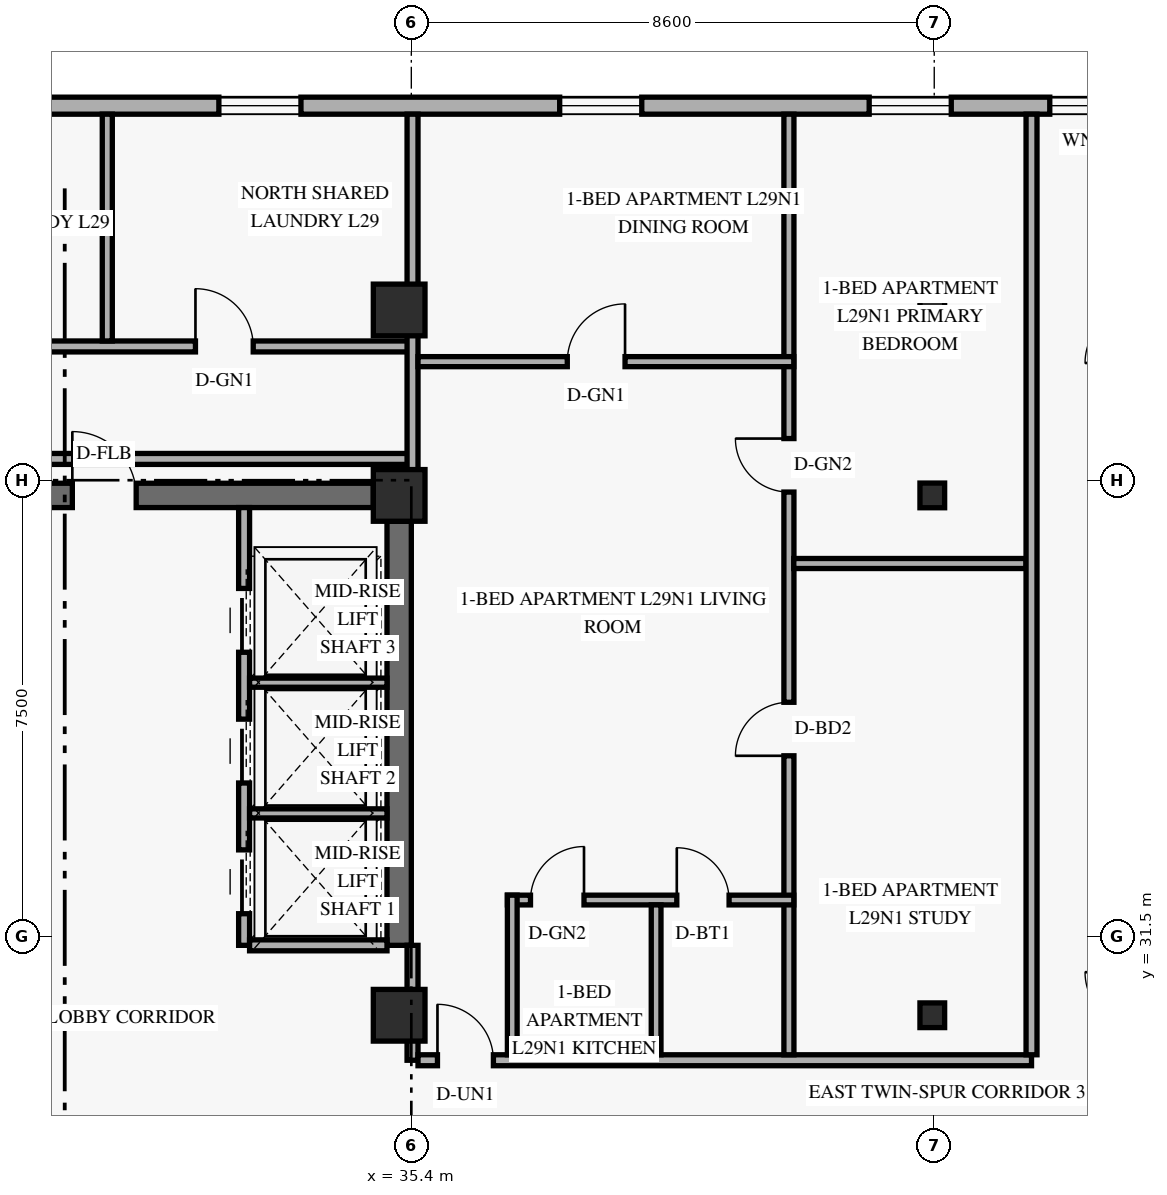
"""IFC4 building model, lengths in metres.
Left out: names, types, materials, properties, quantities, classifications, styles, units other than length and angle.
Written with IfcOpenShell. Run it as: python <this file> out.ifc"""

import sys

from ifc_helpers import new_model, si_unit, direction, frame, frame_2d, origin, origin_2d, place, context, subcontext, project, spatial, rectangle, hollow_rectangle, extrude, element, fill, save


model = new_model("IFC4")
c1 = context("Model", 3, precision=1e-05, world=origin(), true_north=direction((0.0, 1.0)))
c2 = subcontext(c1, "Body", "Model", "MODEL_VIEW")
j1 = project(units=[si_unit("LENGTHUNIT", "METRE"), si_unit("PLANEANGLEUNIT", "RADIAN")], contexts=[c1])
p1 = place(None, origin())
s1 = spatial("IfcSite", under=j1, at=p1, CompositionType="ELEMENT")
p2 = place(p1, origin())
s2 = spatial("IfcBuilding", under=s1, at=p2, CompositionType="ELEMENT")
p3 = place(p2, frame((0.0, 0.0, 113.4)))
s3 = spatial("IfcBuildingStorey", under=s2, at=p3, CompositionType="ELEMENT", Elevation=113.4)
p4 = place(p3, frame((35.2, 31.35, 0.0), z_axis=(0.0, 0.0, 1.0), x_axis=(0.0, 1.0, 0.0)))
e1 = element("IfcWall", 1, at=p4, inside=s3, PredefinedType="SHEAR", context=c2, shape_type="SweptSolid", body=[
    extrude(rectangle(XDim=6.975, YDim=0.4, at=frame_2d((3.487, 0.0))), origin(), (0.0, 0.0, 1.0), 2.739),
])
p5 = place(p3, frame((24.625, 38.75, 0.0), z_axis=(0.0, 0.0, 1.0), x_axis=(1.0, 0.0, 0.0)))
e2 = element("IfcWall", 2, at=p5, inside=s3, PredefinedType="SHEAR", context=c2, shape_type="SweptSolid", body=[
    extrude(rectangle(XDim=10.15, YDim=0.4, at=frame_2d((5.075, 0.0))), origin(), (0.0, 0.0, 1.0), 3.35),
])
p6 = place(p5, frame((5.2, 0.0, 0.0)))
e3 = element("IfcOpeningElement", 3, at=p6, cuts=e2, PredefinedType="OPENING", context=c2, shape_type="SweptSolid", body=[
    extrude(rectangle(XDim=1.05, YDim=2.15, at=frame_2d((0.525, 1.075))), frame((0.0, 0.21, 0.0), z_axis=(0.0, -1.0, 0.0), x_axis=(1.0, 0.0, 0.0)), (0.0, 0.0, 1.0), 0.42),
])
for number, where, z_axis, x_axis in (
    (4, (35.2, 30.2, 0.0), (0.0, 0.0, 1.0), (1.0, 0.0, 0.0)),
    (5, (35.2, 38.75, 0.0), (0.0, 0.0, 1.0), (1.0, 0.0, 0.0)),
    (6, (35.2, 41.8, 0.0), (0.0, 0.0, 1.0), (1.0, 0.0, 0.0)),
):
    element("IfcColumn", number, at=place(p3, frame(where, z_axis=z_axis, x_axis=x_axis)), inside=s3, PredefinedType="COLUMN", context=c2, shape_type="SweptSolid", body=[
        extrude(rectangle(XDim=0.85, YDim=0.85, at=origin_2d()), origin(), (0.0, 0.0, 1.0), 3.6),
    ])
for number, where, z_axis, x_axis in (
    (7, (43.905, 30.2, 0.0), (0.035, 0.0, 0.999), (0.0, 1.0, 0.0)),
    (8, (43.905, 38.75, 0.0), (0.035, 0.0, 0.999), (0.0, 1.0, 0.0)),
    (9, (43.905, 41.8, 0.0), (0.035, 0.0, 0.999), (0.0, 1.0, 0.0)),
):
    element("IfcColumn", number, at=place(p3, frame(where, z_axis=z_axis, x_axis=x_axis)), inside=s3, PredefinedType="COLUMN", context=c2, shape_type="SweptSolid", body=[
        extrude(hollow_rectangle(XDim=0.406, YDim=0.406, WallThickness=0.016, at=origin_2d()), origin(), (0.0, 0.0, 1.0), 3.602),
    ])
p7 = place(p3, frame((49.98, 45.16, 0.0), z_axis=(0.0, 0.0, 1.0), x_axis=(-1.0, 0.0, 0.0)))
e10 = element("IfcWall", 10, at=p7, inside=s3, PredefinedType="SOLIDWALL", context=c2, shape_type="SweptSolid", body=[
    extrude(rectangle(XDim=36.56, YDim=0.28, at=frame_2d((18.28, 0.0))), origin(), (0.0, 0.0, 1.0), 3.35),
])
p8 = place(p7, frame((31.77, 0.0, 0.85)))
e11 = element("IfcOpeningElement", 11, at=p8, cuts=e10, PredefinedType="OPENING", context=c2, shape_type="SweptSolid", body=[
    extrude(rectangle(XDim=1.35, YDim=1.55, at=frame_2d((0.675, 0.775))), frame((0.0, 0.15, 0.0), z_axis=(0.0, -1.0, 0.0), x_axis=(1.0, 0.0, 0.0)), (0.0, 0.0, 1.0), 0.3),
])
p9 = place(p7, frame((23.28, 0.0, 0.85)))
e12 = element("IfcOpeningElement", 12, at=p9, cuts=e10, PredefinedType="OPENING", context=c2, shape_type="SweptSolid", body=[
    extrude(rectangle(XDim=1.35, YDim=1.55, at=frame_2d((0.675, 0.775))), frame((0.0, 0.15, 0.0), z_axis=(0.0, -1.0, 0.0), x_axis=(1.0, 0.0, 0.0)), (0.0, 0.0, 1.0), 0.3),
])
p10 = place(p7, frame((16.395, 0.0, 0.85)))
e13 = element("IfcOpeningElement", 13, at=p10, cuts=e10, PredefinedType="OPENING", context=c2, shape_type="SweptSolid", body=[
    extrude(rectangle(XDim=1.35, YDim=1.55, at=frame_2d((0.675, 0.775))), frame((0.0, 0.15, 0.0), z_axis=(0.0, -1.0, 0.0), x_axis=(1.0, 0.0, 0.0)), (0.0, 0.0, 1.0), 0.3),
])
p11 = place(p7, frame((10.79, 0.0, 0.85)))
e14 = element("IfcOpeningElement", 14, at=p11, cuts=e10, PredefinedType="OPENING", context=c2, shape_type="SweptSolid", body=[
    extrude(rectangle(XDim=1.35, YDim=1.55, at=frame_2d((0.675, 0.775))), frame((0.0, 0.15, 0.0), z_axis=(0.0, -1.0, 0.0), x_axis=(1.0, 0.0, 0.0)), (0.0, 0.0, 1.0), 0.3),
])
p12 = place(p7, frame((5.7, 0.0, 0.85)))
e15 = element("IfcOpeningElement", 15, at=p12, cuts=e10, PredefinedType="OPENING", context=c2, shape_type="SweptSolid", body=[
    extrude(rectangle(XDim=1.35, YDim=1.55, at=frame_2d((0.675, 0.775))), frame((0.0, 0.15, 0.0), z_axis=(0.0, -1.0, 0.0), x_axis=(1.0, 0.0, 0.0)), (0.0, 0.0, 1.0), 0.3),
])
p13 = place(p7, frame((2.88, 0.0, 0.85)))
e16 = element("IfcOpeningElement", 16, at=p13, cuts=e10, PredefinedType="OPENING", context=c2, shape_type="SweptSolid", body=[
    extrude(rectangle(XDim=1.2, YDim=1.5, at=frame_2d((0.6, 0.75))), frame((0.0, 0.15, 0.0), z_axis=(0.0, -1.0, 0.0), x_axis=(1.0, 0.0, 0.0)), (0.0, 0.0, 1.0), 0.3),
])
p14 = place(p7, frame((0.615, 0.0, 0.85)))
e17 = element("IfcOpeningElement", 17, at=p14, cuts=e10, PredefinedType="OPENING", context=c2, shape_type="SweptSolid", body=[
    extrude(rectangle(XDim=1.35, YDim=1.55, at=frame_2d((0.675, 0.775))), frame((0.0, 0.15, 0.0), z_axis=(0.0, -1.0, 0.0), x_axis=(1.0, 0.0, 0.0)), (0.0, 0.0, 1.0), 0.3),
])
p15 = place(p3, frame((32.65, 31.35, 0.0), z_axis=(0.0, 0.0, 1.0), x_axis=(0.0, 1.0, 0.0)))
e18 = element("IfcWall", 18, at=p15, inside=s3, PredefinedType="STANDARD", context=c2, shape_type="SweptSolid", body=[
    extrude(rectangle(XDim=7.2, YDim=0.18, at=frame_2d((3.6, 0.0))), origin(), (0.0, 0.0, 1.0), 3.35),
])
p16 = place(p15, frame((0.52, 0.0, 0.0)))
e19 = element("IfcOpeningElement", 19, at=p16, cuts=e18, PredefinedType="OPENING", context=c2, shape_type="SweptSolid", body=[
    extrude(rectangle(XDim=1.05, YDim=2.2, at=frame_2d((0.525, 1.1))), frame((0.0, 0.1, 0.0), z_axis=(0.0, -1.0, 0.0), x_axis=(1.0, 0.0, 0.0)), (0.0, 0.0, 1.0), 0.2),
])
p17 = place(p15, frame((2.67, 0.0, 0.0)))
e20 = element("IfcOpeningElement", 20, at=p17, cuts=e18, PredefinedType="OPENING", context=c2, shape_type="SweptSolid", body=[
    extrude(rectangle(XDim=1.05, YDim=2.2, at=frame_2d((0.525, 1.1))), frame((0.0, 0.1, 0.0), z_axis=(0.0, -1.0, 0.0), x_axis=(1.0, 0.0, 0.0)), (0.0, 0.0, 1.0), 0.2),
])
p18 = place(p15, frame((4.82, 0.0, 0.0)))
e21 = element("IfcOpeningElement", 21, at=p18, cuts=e18, PredefinedType="OPENING", context=c2, shape_type="SweptSolid", body=[
    extrude(rectangle(XDim=1.05, YDim=2.2, at=frame_2d((0.525, 1.1))), frame((0.0, 0.1, 0.0), z_axis=(0.0, -1.0, 0.0), x_axis=(1.0, 0.0, 0.0)), (0.0, 0.0, 1.0), 0.2),
])
p19 = place(p3, frame((32.74, 31.35, 0.0), z_axis=(0.0, 0.0, 1.0), x_axis=(1.0, 0.0, 0.0)))
e22 = element("IfcWall", 22, at=p19, inside=s3, PredefinedType="STANDARD", context=c2, shape_type="SweptSolid", body=[
    extrude(rectangle(XDim=2.26, YDim=0.18, at=frame_2d((1.13, 0.0))), origin(), (0.0, 0.0, 1.0), 3.35),
])
for number, where, z_axis, x_axis in (
    (23, (32.74, 33.52, 0.0), (0.0, 0.0, 1.0), (1.0, 0.0, 0.0)),
    (24, (32.74, 35.67, 0.0), (0.0, 0.0, 1.0), (1.0, 0.0, 0.0)),
):
    element("IfcWall", number, at=place(p3, frame(where, z_axis=z_axis, x_axis=x_axis)), inside=s3, PredefinedType="STANDARD", context=c2, shape_type="SweptSolid", body=[
        extrude(rectangle(XDim=2.26, YDim=0.15, at=frame_2d((1.13, 0.0))), origin(), (0.0, 0.0, 1.0), 3.35),
    ])
p20 = place(p3, frame((35.42, 29.46, 0.0), z_axis=(0.0, 0.0, 1.0), x_axis=(0.0, 1.0, 0.0)))
e25 = element("IfcWall", 25, at=p20, inside=s3, PredefinedType="STANDARD", context=c2, shape_type="SweptSolid", body=[
    extrude(rectangle(XDim=1.89, YDim=0.18, at=frame_2d((0.945, 0.0))), origin(), (0.0, 0.0, 1.0), 2.721),
])
p21 = place(p3, frame((35.51, 29.46, 0.0), z_axis=(0.0, 0.0, 1.0), x_axis=(1.0, 0.0, 0.0)))
e26 = element("IfcWall", 26, at=p21, inside=s3, PredefinedType="STANDARD", context=c2, shape_type="SweptSolid", body=[
    extrude(rectangle(XDim=10.09, YDim=0.18, at=frame_2d((5.045, 0.0))), origin(), (0.0, 0.0, 1.0), 2.721),
])
p22 = place(p21, frame((0.32, 0.0, 0.0)))
e27 = element("IfcOpeningElement", 27, at=p22, cuts=e26, PredefinedType="OPENING", context=c2, shape_type="SweptSolid", body=[
    extrude(rectangle(XDim=0.92, YDim=2.15, at=frame_2d((0.46, 1.075))), frame((0.0, 0.1, 0.0), z_axis=(0.0, -1.0, 0.0), x_axis=(1.0, 0.0, 0.0)), (0.0, 0.0, 1.0), 0.2),
])
p23 = place(p3, frame((21.74, 41.2, 0.0), z_axis=(0.0, 0.0, 1.0), x_axis=(1.0, 0.0, 0.0)))
e28 = element("IfcWall", 28, at=p23, inside=s3, PredefinedType="STANDARD", context=c2, shape_type="SweptSolid", body=[
    extrude(rectangle(XDim=13.68, YDim=0.18, at=frame_2d((6.84, 0.0))), origin(), (0.0, 0.0, 1.0), 2.721),
])
p24 = place(p23, frame((3.09, 0.0, 0.0)))
e29 = element("IfcOpeningElement", 29, at=p24, cuts=e28, PredefinedType="OPENING", context=c2, shape_type="SweptSolid", body=[
    extrude(rectangle(XDim=0.95, YDim=2.15, at=frame_2d((0.475, 1.075))), frame((0.0, 0.1, 0.0), z_axis=(0.0, -1.0, 0.0), x_axis=(1.0, 0.0, 0.0)), (0.0, 0.0, 1.0), 0.2),
])
p25 = place(p23, frame((10.11, 0.0, 0.0)))
e30 = element("IfcOpeningElement", 30, at=p25, cuts=e28, PredefinedType="OPENING", context=c2, shape_type="SweptSolid", body=[
    extrude(rectangle(XDim=0.95, YDim=2.15, at=frame_2d((0.475, 1.075))), frame((0.0, 0.1, 0.0), z_axis=(0.0, -1.0, 0.0), x_axis=(1.0, 0.0, 0.0)), (0.0, 0.0, 1.0), 0.2),
])
p26 = place(p3, frame((23.85, 39.35, 0.0), z_axis=(0.0, 0.0, 1.0), x_axis=(1.0, 0.0, 0.0)))
e31 = element("IfcWall", 31, at=p26, inside=s3, PredefinedType="STANDARD", context=c2, shape_type="SweptSolid", body=[
    extrude(rectangle(XDim=11.57, YDim=0.18, at=frame_2d((5.785, 0.0))), origin(), (0.0, 0.0, 1.0), 2.721),
])
p27 = place(p3, frame((35.42, 38.75, 0.0), z_axis=(0.0, 0.0, 1.0), x_axis=(0.0, 1.0, 0.0)))
e32 = element("IfcWall", 32, at=p27, inside=s3, PredefinedType="PARTITIONING", context=c2, shape_type="SweptSolid", body=[
    extrude(rectangle(XDim=6.27, YDim=0.18, at=frame_2d((3.135, 0.0))), origin(), (0.0, 0.0, 1.0), 2.721),
])
p28 = place(p3, frame((41.61, 29.55, 0.0), z_axis=(0.0, 0.0, 1.0), x_axis=(0.0, 1.0, 0.0)))
e33 = element("IfcWall", 33, at=p28, inside=s3, PredefinedType="PARTITIONING", context=c2, shape_type="SweptSolid", body=[
    extrude(rectangle(XDim=15.47, YDim=0.165, at=frame_2d((7.735, 0.0))), origin(), (0.0, 0.0, 1.0), 2.721),
])
p29 = place(p28, frame((4.917, 0.0, 0.0)))
e34 = element("IfcOpeningElement", 34, at=p29, cuts=e33, PredefinedType="OPENING", context=c2, shape_type="SweptSolid", body=[
    extrude(rectangle(XDim=0.88, YDim=2.14, at=frame_2d((0.44, 1.07))), frame((0.0, 0.093, 0.0), z_axis=(0.0, -1.0, 0.0), x_axis=(1.0, 0.0, 0.0)), (0.0, 0.0, 1.0), 0.185),
])
p30 = place(p28, frame((9.255, 0.0, 0.0)))
e35 = element("IfcOpeningElement", 35, at=p30, cuts=e33, PredefinedType="OPENING", context=c2, shape_type="SweptSolid", body=[
    extrude(rectangle(XDim=0.88, YDim=2.12, at=frame_2d((0.44, 1.06))), frame((0.0, 0.093, 0.0), z_axis=(0.0, -1.0, 0.0), x_axis=(1.0, 0.0, 0.0)), (0.0, 0.0, 1.0), 0.185),
])
p31 = place(p3, frame((36.98, 32.095, 0.0), z_axis=(0.0, 0.0, 1.0), x_axis=(1.0, 0.0, 0.0)))
e36 = element("IfcWall", 36, at=p31, inside=s3, PredefinedType="PLUMBINGWALL", context=c2, shape_type="SweptSolid", body=[
    extrude(rectangle(XDim=4.71, YDim=0.16, at=frame_2d((2.355, 0.0))), origin(), (0.0, 0.0, 1.0), 3.35),
])
p32 = place(p31, frame((0.38, 0.0, 0.0)))
e37 = element("IfcOpeningElement", 37, at=p32, cuts=e36, PredefinedType="OPENING", context=c2, shape_type="SweptSolid", body=[
    extrude(rectangle(XDim=0.88, YDim=2.12, at=frame_2d((0.44, 1.06))), frame((0.0, 0.09, 0.0), z_axis=(0.0, -1.0, 0.0), x_axis=(1.0, 0.0, 0.0)), (0.0, 0.0, 1.0), 0.18),
])
p33 = place(p31, frame((2.786, 0.0, 0.0)))
e38 = element("IfcOpeningElement", 38, at=p33, cuts=e36, PredefinedType="OPENING", context=c2, shape_type="SweptSolid", body=[
    extrude(rectangle(XDim=0.86, YDim=2.12, at=frame_2d((0.43, 1.06))), frame((0.0, 0.09, 0.0), z_axis=(0.0, -1.0, 0.0), x_axis=(1.0, 0.0, 0.0)), (0.0, 0.0, 1.0), 0.18),
])
p34 = place(p3, frame((37.06, 29.55, 0.0), z_axis=(0.0, 0.0, 1.0), x_axis=(0.0, 1.0, 0.0)))
e39 = element("IfcWall", 39, at=p34, inside=s3, PredefinedType="PLUMBINGWALL", context=c2, shape_type="SweptSolid", body=[
    extrude(rectangle(XDim=2.625, YDim=0.16, at=frame_2d((1.312, 0.0))), origin(), (0.0, 0.0, 1.0), 2.721),
])
p35 = place(p3, frame((39.426, 29.55, 0.0), z_axis=(0.0, 0.0, 1.0), x_axis=(0.0, 1.0, 0.0)))
e40 = element("IfcWall", 40, at=p35, inside=s3, PredefinedType="PLUMBINGWALL", context=c2, shape_type="SweptSolid", body=[
    extrude(rectangle(XDim=2.465, YDim=0.16, at=frame_2d((1.232, 0.0))), origin(), (0.0, 0.0, 1.0), 2.721),
])
p36 = place(p3, frame((35.51, 40.95, 0.0), z_axis=(0.0, 0.0, 1.0), x_axis=(1.0, 0.0, 0.0)))
e41 = element("IfcWall", 41, at=p36, inside=s3, PredefinedType="PARTITIONING", context=c2, shape_type="SweptSolid", body=[
    extrude(rectangle(XDim=6.18, YDim=0.165, at=frame_2d((3.09, 0.0))), origin(), (0.0, 0.0, 1.0), 3.35),
])
p37 = place(p36, frame((2.455, 0.0, 0.0)))
e42 = element("IfcOpeningElement", 42, at=p37, cuts=e41, PredefinedType="OPENING", context=c2, shape_type="SweptSolid", body=[
    extrude(rectangle(XDim=0.95, YDim=2.15, at=frame_2d((0.475, 1.075))), frame((0.0, 0.093, 0.0), z_axis=(0.0, -1.0, 0.0), x_axis=(1.0, 0.0, 0.0)), (0.0, 0.0, 1.0), 0.185),
])
p38 = place(p3, frame((41.69, 37.63, 0.0), z_axis=(0.0, 0.0, 1.0), x_axis=(1.0, 0.0, 0.0)))
e43 = element("IfcWall", 43, at=p38, inside=s3, PredefinedType="PARTITIONING", context=c2, shape_type="SweptSolid", body=[
    extrude(rectangle(XDim=3.82, YDim=0.165, at=frame_2d((1.91, 0.0))), origin(), (0.0, 0.0, 1.0), 2.721),
])
p39 = place(p3, frame((45.6, 29.55, 0.0), z_axis=(0.0, 0.0, 1.0), x_axis=(0.0, 1.0, 0.0)))
e44 = element("IfcWall", 44, at=p39, inside=s3, PredefinedType="STANDARD", context=c2, shape_type="SweptSolid", body=[
    extrude(rectangle(XDim=15.47, YDim=0.18, at=frame_2d((7.735, 0.0))), origin(), (0.0, 0.0, 1.0), 2.721),
])
p40 = place(p3, frame((30.4, 41.29, 0.0), z_axis=(0.0, 0.0, 1.0), x_axis=(0.0, 1.0, 0.0)))
e45 = element("IfcWall", 45, at=p40, inside=s3, PredefinedType="PARTITIONING", context=c2, shape_type="SweptSolid", body=[
    extrude(rectangle(XDim=3.73, YDim=0.165, at=frame_2d((1.865, 0.0))), origin(), (0.0, 0.0, 1.0), 2.799),
])
p41 = place(p10, origin())
e46 = element("IfcWindow", 46, at=p41, inside=s3, PartitioningType="SINGLE_PANEL", PredefinedType="WINDOW", context=c2, shape_type="SweptSolid", body=[
    extrude(rectangle(XDim=1.35, YDim=1.55, at=frame_2d((0.675, 0.775))), frame((0.0, 0.03, 0.0), z_axis=(0.0, -1.0, 0.0), x_axis=(1.0, 0.0, 0.0)), (0.0, 0.0, 1.0), 0.06),
])
fill(e13, e46)
p42 = place(p11, origin())
e47 = element("IfcWindow", 47, at=p42, inside=s3, PartitioningType="SINGLE_PANEL", PredefinedType="WINDOW", context=c2, shape_type="SweptSolid", body=[
    extrude(rectangle(XDim=1.35, YDim=1.55, at=frame_2d((0.675, 0.775))), frame((0.0, 0.03, 0.0), z_axis=(0.0, -1.0, 0.0), x_axis=(1.0, 0.0, 0.0)), (0.0, 0.0, 1.0), 0.06),
])
fill(e14, e47)
p43 = place(p12, origin())
e48 = element("IfcWindow", 48, at=p43, inside=s3, PartitioningType="SINGLE_PANEL", PredefinedType="WINDOW", context=c2, shape_type="SweptSolid", body=[
    extrude(rectangle(XDim=1.35, YDim=1.55, at=frame_2d((0.675, 0.775))), frame((0.0, 0.03, 0.0), z_axis=(0.0, -1.0, 0.0), x_axis=(1.0, 0.0, 0.0)), (0.0, 0.0, 1.0), 0.06),
])
fill(e15, e48)
p44 = place(p13, origin())
e49 = element("IfcWindow", 49, at=p44, inside=s3, PartitioningType="SINGLE_PANEL", PredefinedType="WINDOW", context=c2, shape_type="SweptSolid", body=[
    extrude(rectangle(XDim=1.2, YDim=1.5, at=frame_2d((0.6, 0.75))), frame((0.0, 0.03, 0.0), z_axis=(0.0, -1.0, 0.0), x_axis=(1.0, 0.0, 0.0)), (0.0, 0.0, 1.0), 0.06),
])
fill(e16, e49)
p45 = place(p16, origin())
e50 = element("IfcDoor", 50, at=p45, inside=s3, OperationType="SLIDING_TO_LEFT", PredefinedType="DOOR", context=c2, shape_type="SweptSolid", body=[
    extrude(rectangle(XDim=1.05, YDim=2.2, at=frame_2d((0.525, 1.1))), frame((0.0, 0.025, 0.0), z_axis=(0.0, -1.0, 0.0), x_axis=(1.0, 0.0, 0.0)), (0.0, 0.0, 1.0), 0.05),
])
fill(e19, e50)
p46 = place(p17, origin())
e51 = element("IfcDoor", 51, at=p46, inside=s3, OperationType="SLIDING_TO_LEFT", PredefinedType="DOOR", context=c2, shape_type="SweptSolid", body=[
    extrude(rectangle(XDim=1.05, YDim=2.2, at=frame_2d((0.525, 1.1))), frame((0.0, 0.025, 0.0), z_axis=(0.0, -1.0, 0.0), x_axis=(1.0, 0.0, 0.0)), (0.0, 0.0, 1.0), 0.05),
])
fill(e20, e51)
p47 = place(p18, origin())
e52 = element("IfcDoor", 52, at=p47, inside=s3, OperationType="SLIDING_TO_LEFT", PredefinedType="DOOR", context=c2, shape_type="SweptSolid", body=[
    extrude(rectangle(XDim=1.05, YDim=2.2, at=frame_2d((0.525, 1.1))), frame((0.0, 0.025, 0.0), z_axis=(0.0, -1.0, 0.0), x_axis=(1.0, 0.0, 0.0)), (0.0, 0.0, 1.0), 0.05),
])
fill(e21, e52)
p48 = place(p6, frame((1.05, 0.0, 0.0), z_axis=(0.0, 0.0, 1.0), x_axis=(-1.0, 0.0, 0.0)))
e53 = element("IfcDoor", 53, at=p48, inside=s3, OperationType="SINGLE_SWING_RIGHT", PredefinedType="DOOR", context=c2, shape_type="SweptSolid", body=[
    extrude(rectangle(XDim=1.05, YDim=2.15, at=frame_2d((0.525, 1.075))), frame((0.0, 0.025, 0.0), z_axis=(0.0, -1.0, 0.0), x_axis=(1.0, 0.0, 0.0)), (0.0, 0.0, 1.0), 0.05),
])
fill(e3, e53)
p49 = place(p37, origin())
e54 = element("IfcDoor", 54, at=p49, inside=s3, OperationType="SINGLE_SWING_RIGHT", PredefinedType="DOOR", context=c2, shape_type="SweptSolid", body=[
    extrude(rectangle(XDim=0.95, YDim=2.15, at=frame_2d((0.475, 1.075))), frame((0.0, 0.025, 0.0), z_axis=(0.0, -1.0, 0.0), x_axis=(1.0, 0.0, 0.0)), (0.0, 0.0, 1.0), 0.05),
])
fill(e42, e54)
p50 = place(p22, origin())
e55 = element("IfcDoor", 55, at=p50, inside=s3, OperationType="SINGLE_SWING_LEFT", PredefinedType="DOOR", context=c2, shape_type="SweptSolid", body=[
    extrude(rectangle(XDim=0.92, YDim=2.15, at=frame_2d((0.46, 1.075))), frame((0.0, 0.025, 0.0), z_axis=(0.0, -1.0, 0.0), x_axis=(1.0, 0.0, 0.0)), (0.0, 0.0, 1.0), 0.05),
])
fill(e27, e55)
p51 = place(p32, origin())
e56 = element("IfcDoor", 56, at=p51, inside=s3, OperationType="SINGLE_SWING_RIGHT", PredefinedType="DOOR", context=c2, shape_type="SweptSolid", body=[
    extrude(rectangle(XDim=0.88, YDim=2.12, at=frame_2d((0.44, 1.06))), frame((0.0, 0.025, 0.0), z_axis=(0.0, -1.0, 0.0), x_axis=(1.0, 0.0, 0.0)), (0.0, 0.0, 1.0), 0.05),
])
fill(e37, e56)
p52 = place(p33, origin())
e57 = element("IfcDoor", 57, at=p52, inside=s3, OperationType="SINGLE_SWING_LEFT", PredefinedType="DOOR", context=c2, shape_type="SweptSolid", body=[
    extrude(rectangle(XDim=0.86, YDim=2.12, at=frame_2d((0.43, 1.06))), frame((0.0, 0.025, 0.0), z_axis=(0.0, -1.0, 0.0), x_axis=(1.0, 0.0, 0.0)), (0.0, 0.0, 1.0), 0.05),
])
fill(e38, e57)
p53 = place(p29, origin())
e58 = element("IfcDoor", 58, at=p53, inside=s3, OperationType="SINGLE_SWING_LEFT", PredefinedType="DOOR", context=c2, shape_type="SweptSolid", body=[
    extrude(rectangle(XDim=0.88, YDim=2.14, at=frame_2d((0.44, 1.07))), frame((0.0, 0.025, 0.0), z_axis=(0.0, -1.0, 0.0), x_axis=(1.0, 0.0, 0.0)), (0.0, 0.0, 1.0), 0.05),
])
fill(e34, e58)
p54 = place(p30, origin())
e59 = element("IfcDoor", 59, at=p54, inside=s3, OperationType="SINGLE_SWING_RIGHT", PredefinedType="DOOR", context=c2, shape_type="SweptSolid", body=[
    extrude(rectangle(XDim=0.88, YDim=2.12, at=frame_2d((0.44, 1.06))), frame((0.0, 0.025, 0.0), z_axis=(0.0, -1.0, 0.0), x_axis=(1.0, 0.0, 0.0)), (0.0, 0.0, 1.0), 0.05),
])
fill(e35, e59)
p55 = place(p25, origin())
e60 = element("IfcDoor", 60, at=p55, inside=s3, OperationType="SINGLE_SWING_LEFT", PredefinedType="DOOR", context=c2, shape_type="SweptSolid", body=[
    extrude(rectangle(XDim=0.95, YDim=2.15, at=frame_2d((0.475, 1.075))), frame((0.0, 0.025, 0.0), z_axis=(0.0, -1.0, 0.0), x_axis=(1.0, 0.0, 0.0)), (0.0, 0.0, 1.0), 0.05),
])
fill(e30, e60)
save(model, sys.argv[1])
